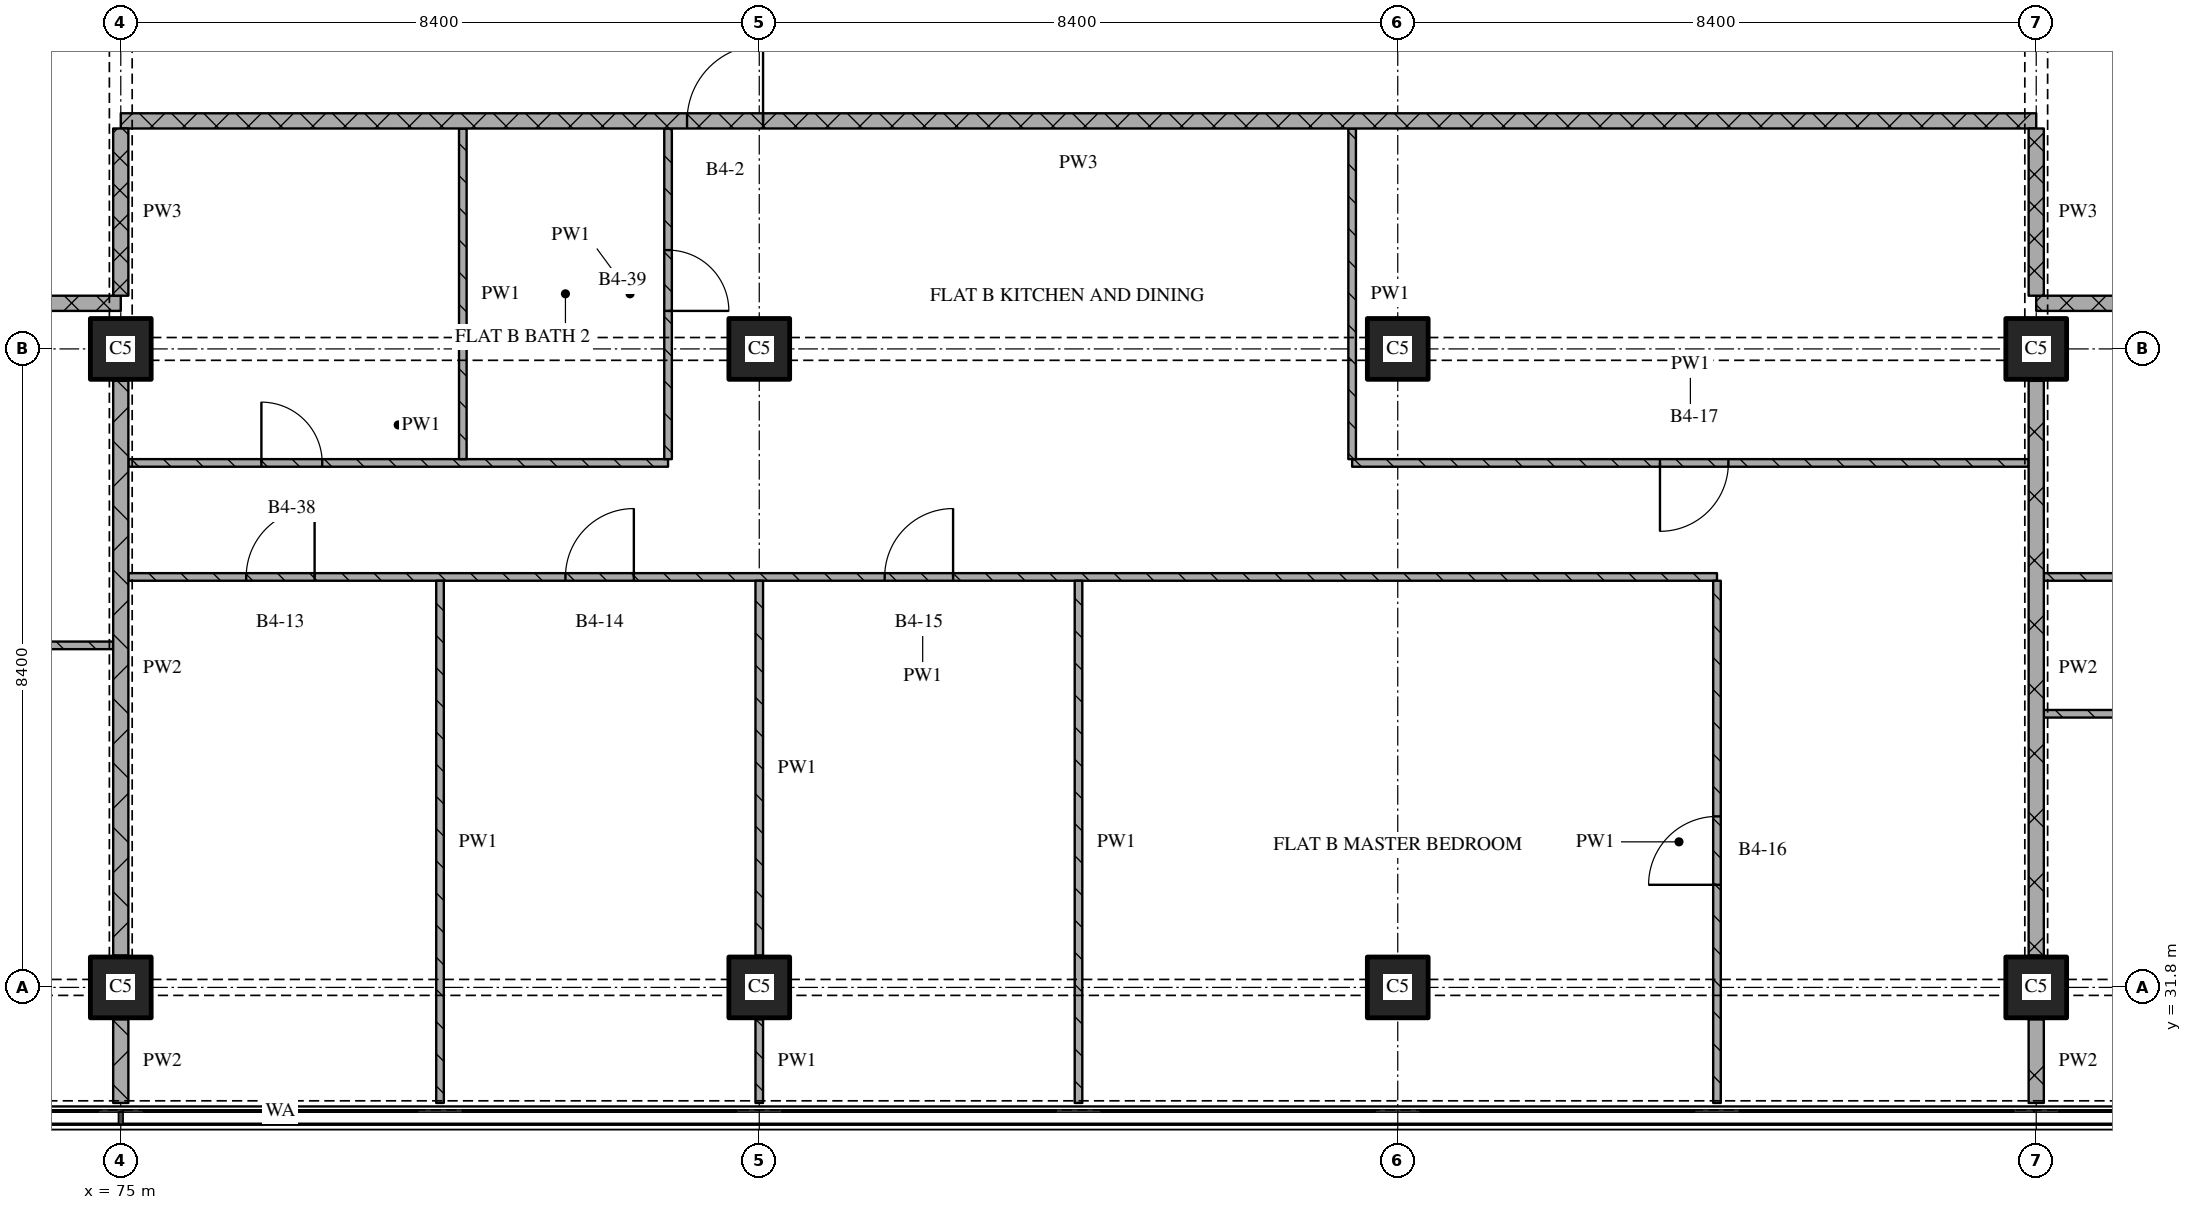
"""IFC4 building model, lengths in metres.
Left out: names, types, materials, properties, quantities, classifications, styles, units other than length and angle.
Written with IfcOpenShell. Run it as: python <this file> out.ifc"""

import sys

from ifc_helpers import new_model, si_unit, direction, frame, frame_2d, origin, origin_2d, place, context, subcontext, project, spatial, rectangle, extrude, element, fill, save


model = new_model("IFC4")
c1 = context("Model", 3, precision=1e-05, world=origin(), true_north=direction((0.0, 1.0)))
c2 = subcontext(c1, "Body", "Model", "MODEL_VIEW")
j1 = project(units=[si_unit("LENGTHUNIT", "METRE"), si_unit("PLANEANGLEUNIT", "RADIAN")], contexts=[c1])
p1 = place(None, origin())
s1 = spatial("IfcSite", under=j1, at=p1, CompositionType="ELEMENT")
p2 = place(p1, origin())
s2 = spatial("IfcBuilding", under=s1, at=p2, CompositionType="ELEMENT")
p3 = place(p2, frame((0.0, 0.0, 131.25)))
s3 = spatial("IfcBuildingStorey", under=s2, at=p3, CompositionType="ELEMENT", Elevation=131.25)
for number, where, z_axis, x_axis in (
    (1, (75.0, 31.8, 0.0), (0.0, 0.0, 1.0), (1.0, 0.0, 0.0)),
    (2, (75.0, 40.2, 0.0), (0.0, 0.0, 1.0), (1.0, 0.0, 0.0)),
    (3, (83.4, 31.8, 0.0), (0.0, 0.0, 1.0), (1.0, 0.0, 0.0)),
    (4, (83.4, 40.2, 0.0), (0.0, 0.0, 1.0), (1.0, 0.0, 0.0)),
    (5, (91.8, 31.8, 0.0), (0.0, 0.0, 1.0), (1.0, 0.0, 0.0)),
    (6, (91.8, 40.2, 0.0), (0.0, 0.0, 1.0), (1.0, 0.0, 0.0)),
    (7, (100.2, 31.8, 0.0), (0.0, 0.0, 1.0), (1.0, 0.0, 0.0)),
    (8, (100.2, 40.2, 0.0), (0.0, 0.0, 1.0), (1.0, 0.0, 0.0)),
):
    element("IfcColumn", number, at=place(p3, frame(where, z_axis=z_axis, x_axis=x_axis)), inside=s3, PredefinedType="COLUMN", context=c2, shape_type="SweptSolid", body=[
        extrude(rectangle(XDim=0.8, YDim=0.8, at=origin_2d()), origin(), (0.0, 0.0, 1.0), 3.6),
    ])
p4 = place(p3, frame((100.3, 35.4, 0.0), z_axis=(0.0, 0.0, 1.0), x_axis=(1.0, 0.0, 0.0)))
e9 = element("IfcWall", 9, at=p4, inside=s3, PredefinedType="PARTITIONING", context=c2, shape_type="SweptSolid", body=[
    extrude(rectangle(XDim=8.3, YDim=0.1, at=frame_2d((4.15, 0.0))), origin(), (0.0, 0.0, 1.0), 3.32),
])
p5 = place(p3, frame((65.7, 36.3, 0.0), z_axis=(0.0, 0.0, 1.0), x_axis=(1.0, 0.0, 0.0)))
e10 = element("IfcWall", 10, at=p5, inside=s3, PredefinedType="PARTITIONING", context=c2, shape_type="SweptSolid", body=[
    extrude(rectangle(XDim=9.2, YDim=0.1, at=frame_2d((4.6, 0.0))), origin(), (0.0, 0.0, 1.0), 3.32),
])
p6 = place(p5, frame((6.5, 0.0, 0.0)))
e11 = element("IfcOpeningElement", 11, at=p6, cuts=e10, PredefinedType="OPENING", context=c2, shape_type="SweptSolid", body=[
    extrude(rectangle(XDim=0.8, YDim=2.1, at=frame_2d((0.4, 1.05))), frame((0.0, 0.06, 0.0), z_axis=(0.0, -1.0, 0.0), x_axis=(1.0, 0.0, 0.0)), (0.0, 0.0, 1.0), 0.12),
])
p7 = place(p3, frame((96.0, 37.2, 0.0), z_axis=(0.0, 0.0, 1.0), x_axis=(-1.0, 0.0, 0.0)))
e12 = element("IfcWall", 12, at=p7, inside=s3, PredefinedType="PARTITIONING", context=c2, shape_type="SweptSolid", body=[
    extrude(rectangle(XDim=20.9, YDim=0.1, at=frame_2d((10.45, 0.0))), origin(), (0.0, 0.0, 1.0), 3.32),
])
p8 = place(p7, frame((10.05, 0.0, 0.0)))
e13 = element("IfcOpeningElement", 13, at=p8, cuts=e12, PredefinedType="OPENING", context=c2, shape_type="SweptSolid", body=[
    extrude(rectangle(XDim=0.9, YDim=2.1, at=frame_2d((0.45, 1.05))), frame((0.0, 0.06, 0.0), z_axis=(0.0, -1.0, 0.0), x_axis=(1.0, 0.0, 0.0)), (0.0, 0.0, 1.0), 0.12),
])
p9 = place(p7, frame((14.25, 0.0, 0.0)))
e14 = element("IfcOpeningElement", 14, at=p9, cuts=e12, PredefinedType="OPENING", context=c2, shape_type="SweptSolid", body=[
    extrude(rectangle(XDim=0.9, YDim=2.1, at=frame_2d((0.45, 1.05))), frame((0.0, 0.06, 0.0), z_axis=(0.0, -1.0, 0.0), x_axis=(1.0, 0.0, 0.0)), (0.0, 0.0, 1.0), 0.12),
])
p10 = place(p7, frame((18.45, 0.0, 0.0)))
e15 = element("IfcOpeningElement", 15, at=p10, cuts=e12, PredefinedType="OPENING", context=c2, shape_type="SweptSolid", body=[
    extrude(rectangle(XDim=0.9, YDim=2.1, at=frame_2d((0.45, 1.05))), frame((0.0, 0.06, 0.0), z_axis=(0.0, -1.0, 0.0), x_axis=(1.0, 0.0, 0.0)), (0.0, 0.0, 1.0), 0.12),
])
p11 = place(p3, frame((100.3, 37.2, 0.0), z_axis=(0.0, 0.0, 1.0), x_axis=(1.0, 0.0, 0.0)))
e16 = element("IfcWall", 16, at=p11, inside=s3, PredefinedType="PARTITIONING", context=c2, shape_type="SweptSolid", body=[
    extrude(rectangle(XDim=11.0, YDim=0.1, at=frame_2d((5.5, 0.0))), origin(), (0.0, 0.0, 1.0), 3.32),
])
p12 = place(p11, frame((1.75, 0.0, 0.0)))
e17 = element("IfcOpeningElement", 17, at=p12, cuts=e16, PredefinedType="OPENING", context=c2, shape_type="SweptSolid", body=[
    extrude(rectangle(XDim=0.8, YDim=2.1, at=frame_2d((0.4, 1.05))), frame((0.0, 0.06, 0.0), z_axis=(0.0, -1.0, 0.0), x_axis=(1.0, 0.0, 0.0)), (0.0, 0.0, 1.0), 0.12),
])
p13 = place(p11, frame((6.25, 0.0, 0.0)))
e18 = element("IfcOpeningElement", 18, at=p13, cuts=e16, PredefinedType="OPENING", context=c2, shape_type="SweptSolid", body=[
    extrude(rectangle(XDim=0.8, YDim=2.1, at=frame_2d((0.4, 1.05))), frame((0.0, 0.06, 0.0), z_axis=(0.0, -1.0, 0.0), x_axis=(1.0, 0.0, 0.0)), (0.0, 0.0, 1.0), 0.12),
])
p14 = place(p3, frame((75.1, 38.7, 0.0), z_axis=(0.0, 0.0, 1.0), x_axis=(1.0, 0.0, 0.0)))
e19 = element("IfcWall", 19, at=p14, inside=s3, PredefinedType="PARTITIONING", context=c2, shape_type="SweptSolid", body=[
    extrude(rectangle(XDim=7.1, YDim=0.1, at=frame_2d((3.55, 0.0))), origin(), (0.0, 0.0, 1.0), 3.32),
])
p15 = place(p14, frame((1.75, 0.0, 0.0)))
e20 = element("IfcOpeningElement", 20, at=p15, cuts=e19, PredefinedType="OPENING", context=c2, shape_type="SweptSolid", body=[
    extrude(rectangle(XDim=0.8, YDim=2.1, at=frame_2d((0.4, 1.05))), frame((0.0, 0.06, 0.0), z_axis=(0.0, -1.0, 0.0), x_axis=(1.0, 0.0, 0.0)), (0.0, 0.0, 1.0), 0.12),
])
p16 = place(p3, frame((91.2, 38.7, 0.0), z_axis=(0.0, 0.0, 1.0), x_axis=(1.0, 0.0, 0.0)))
e21 = element("IfcWall", 21, at=p16, inside=s3, PredefinedType="PARTITIONING", context=c2, shape_type="SweptSolid", body=[
    extrude(rectangle(XDim=8.9, YDim=0.1, at=frame_2d((4.45, 0.0))), origin(), (0.0, 0.0, 1.0), 3.32),
])
p17 = place(p16, frame((4.05, 0.0, 0.0)))
e22 = element("IfcOpeningElement", 22, at=p17, cuts=e21, PredefinedType="OPENING", context=c2, shape_type="SweptSolid", body=[
    extrude(rectangle(XDim=0.9, YDim=2.1, at=frame_2d((0.45, 1.05))), frame((0.0, 0.06, 0.0), z_axis=(0.0, -1.0, 0.0), x_axis=(1.0, 0.0, 0.0)), (0.0, 0.0, 1.0), 0.12),
])
p18 = place(p3, frame((75.0, 40.8, 0.0), z_axis=(0.0, 0.0, 1.0), x_axis=(-1.0, 0.0, 0.0)))
e23 = element("IfcWall", 23, at=p18, inside=s3, PredefinedType="PARTITIONING", context=c2, shape_type="SweptSolid", body=[
    extrude(rectangle(XDim=24.18, YDim=0.2, at=frame_2d((12.09, 0.0))), origin(), (0.0, 0.0, 1.0), 3.32),
])
p19 = place(p18, frame((9.55, 0.0, 0.0)))
e24 = element("IfcOpeningElement", 24, at=p19, cuts=e23, PredefinedType="OPENING", context=c2, shape_type="SweptSolid", body=[
    extrude(rectangle(XDim=1.0, YDim=2.1, at=frame_2d((0.5, 1.05))), frame((0.0, 0.11, 0.0), z_axis=(0.0, -1.0, 0.0), x_axis=(1.0, 0.0, 0.0)), (0.0, 0.0, 1.0), 0.22),
])
p20 = place(p3, frame((124.38, 40.8, 0.0), z_axis=(0.0, 0.0, 1.0), x_axis=(-1.0, 0.0, 0.0)))
e25 = element("IfcWall", 25, at=p20, inside=s3, PredefinedType="PARTITIONING", context=c2, shape_type="SweptSolid", body=[
    extrude(rectangle(XDim=24.18, YDim=0.2, at=frame_2d((12.09, 0.0))), origin(), (0.0, 0.0, 1.0), 3.32),
])
p21 = place(p20, frame((11.83, 0.0, 0.0)))
e26 = element("IfcOpeningElement", 26, at=p21, cuts=e25, PredefinedType="OPENING", context=c2, shape_type="SweptSolid", body=[
    extrude(rectangle(XDim=1.0, YDim=2.1, at=frame_2d((0.5, 1.05))), frame((0.0, 0.11, 0.0), z_axis=(0.0, -1.0, 0.0), x_axis=(1.0, 0.0, 0.0)), (0.0, 0.0, 1.0), 0.22),
])
p22 = place(p3, frame((100.2, 43.2, 0.0), z_axis=(0.0, 0.0, 1.0), x_axis=(-1.0, 0.0, 0.0)))
e27 = element("IfcWall", 27, at=p22, inside=s3, PredefinedType="PARTITIONING", context=c2, shape_type="SweptSolid", body=[
    extrude(rectangle(XDim=25.2, YDim=0.2, at=frame_2d((12.6, 0.0))), origin(), (0.0, 0.0, 1.0), 3.32),
])
p23 = place(p22, frame((16.75, 0.0, 0.0)))
e28 = element("IfcOpeningElement", 28, at=p23, cuts=e27, PredefinedType="OPENING", context=c2, shape_type="SweptSolid", body=[
    extrude(rectangle(XDim=1.0, YDim=2.1, at=frame_2d((0.5, 1.05))), frame((0.0, 0.11, 0.0), z_axis=(0.0, -1.0, 0.0), x_axis=(1.0, 0.0, 0.0)), (0.0, 0.0, 1.0), 0.22),
])
p24 = place(p3, frame((75.0, 43.1, 0.0), z_axis=(0.0, 0.0, 1.0), x_axis=(0.0, -1.0, 0.0)))
e29 = element("IfcWall", 29, at=p24, inside=s3, PredefinedType="PARTITIONING", context=c2, shape_type="SweptSolid", body=[
    extrude(rectangle(XDim=2.2, YDim=0.2, at=frame_2d((1.1, 0.0))), origin(), (0.0, 0.0, 1.0), 2.43),
])
p25 = place(p3, frame((75.0, 31.38, 0.0), z_axis=(0.0, 0.0, 1.0), x_axis=(0.0, -1.0, 0.0)))
e30 = element("IfcWall", 30, at=p25, inside=s3, PredefinedType="PARTITIONING", context=c2, shape_type="SweptSolid", body=[
    extrude(rectangle(XDim=1.1, YDim=0.2, at=frame_2d((0.55, 0.0))), origin(), (0.0, 0.0, 1.0), 3.32),
])
p26 = place(p3, frame((75.0, 39.78, 0.0), z_axis=(0.0, 0.0, 1.0), x_axis=(0.0, -1.0, 0.0)))
e31 = element("IfcWall", 31, at=p26, inside=s3, PredefinedType="PARTITIONING", context=c2, shape_type="SweptSolid", body=[
    extrude(rectangle(XDim=7.56, YDim=0.2, at=frame_2d((3.78, 0.0))), origin(), (0.0, 0.0, 1.0), 2.83),
])
p27 = place(p3, frame((79.2, 37.15, 0.0), z_axis=(0.0, 0.0, 1.0), x_axis=(0.0, -1.0, 0.0)))
e32 = element("IfcWall", 32, at=p27, inside=s3, PredefinedType="PARTITIONING", context=c2, shape_type="SweptSolid", body=[
    extrude(rectangle(XDim=6.87, YDim=0.1, at=frame_2d((3.435, 0.0))), origin(), (0.0, 0.0, 1.0), 3.32),
])
p28 = place(p3, frame((79.5, 43.1, 0.0), z_axis=(0.0, 0.0, 1.0), x_axis=(0.0, -1.0, 0.0)))
e33 = element("IfcWall", 33, at=p28, inside=s3, PredefinedType="PARTITIONING", context=c2, shape_type="SweptSolid", body=[
    extrude(rectangle(XDim=4.35, YDim=0.1, at=frame_2d((2.175, 0.0))), origin(), (0.0, 0.0, 1.0), 3.32),
])
p29 = place(p3, frame((82.2, 38.75, 0.0), z_axis=(0.0, 0.0, 1.0), x_axis=(0.0, 1.0, 0.0)))
e34 = element("IfcWall", 34, at=p29, inside=s3, PredefinedType="PARTITIONING", context=c2, shape_type="SweptSolid", body=[
    extrude(rectangle(XDim=4.35, YDim=0.1, at=frame_2d((2.175, 0.0))), origin(), (0.0, 0.0, 1.0), 3.32),
])
p30 = place(p29, frame((1.95, 0.0, 0.0)))
e35 = element("IfcOpeningElement", 35, at=p30, cuts=e34, PredefinedType="OPENING", context=c2, shape_type="SweptSolid", body=[
    extrude(rectangle(XDim=0.8, YDim=2.1, at=frame_2d((0.4, 1.05))), frame((0.0, 0.06, 0.0), z_axis=(0.0, -1.0, 0.0), x_axis=(1.0, 0.0, 0.0)), (0.0, 0.0, 1.0), 0.12),
])
p31 = place(p3, frame((83.4, 31.38, 0.0), z_axis=(0.0, 0.0, 1.0), x_axis=(0.0, -1.0, 0.0)))
e36 = element("IfcWall", 36, at=p31, inside=s3, PredefinedType="PARTITIONING", context=c2, shape_type="SweptSolid", body=[
    extrude(rectangle(XDim=1.1, YDim=0.1, at=frame_2d((0.55, 0.0))), origin(), (0.0, 0.0, 1.0), 3.32),
])
p32 = place(p3, frame((83.4, 37.15, 0.0), z_axis=(0.0, 0.0, 1.0), x_axis=(0.0, -1.0, 0.0)))
e37 = element("IfcWall", 37, at=p32, inside=s3, PredefinedType="PARTITIONING", context=c2, shape_type="SweptSolid", body=[
    extrude(rectangle(XDim=4.93, YDim=0.1, at=frame_2d((2.465, 0.0))), origin(), (0.0, 0.0, 1.0), 3.32),
])
p33 = place(p3, frame((87.6, 37.15, 0.0), z_axis=(0.0, 0.0, 1.0), x_axis=(0.0, -1.0, 0.0)))
e38 = element("IfcWall", 38, at=p33, inside=s3, PredefinedType="PARTITIONING", context=c2, shape_type="SweptSolid", body=[
    extrude(rectangle(XDim=6.87, YDim=0.1, at=frame_2d((3.435, 0.0))), origin(), (0.0, 0.0, 1.0), 3.32),
])
p34 = place(p3, frame((91.2, 43.1, 0.0), z_axis=(0.0, 0.0, 1.0), x_axis=(0.0, -1.0, 0.0)))
e39 = element("IfcWall", 39, at=p34, inside=s3, PredefinedType="PARTITIONING", context=c2, shape_type="SweptSolid", body=[
    extrude(rectangle(XDim=4.35, YDim=0.1, at=frame_2d((2.175, 0.0))), origin(), (0.0, 0.0, 1.0), 3.32),
])
p35 = place(p3, frame((96.0, 30.28, 0.0), z_axis=(0.0, 0.0, 1.0), x_axis=(0.0, 1.0, 0.0)))
e40 = element("IfcWall", 40, at=p35, inside=s3, PredefinedType="PARTITIONING", context=c2, shape_type="SweptSolid", body=[
    extrude(rectangle(XDim=6.87, YDim=0.1, at=frame_2d((3.435, 0.0))), origin(), (0.0, 0.0, 1.0), 3.32),
])
p36 = place(p35, frame((2.87, 0.0, 0.0)))
e41 = element("IfcOpeningElement", 41, at=p36, cuts=e40, PredefinedType="OPENING", context=c2, shape_type="SweptSolid", body=[
    extrude(rectangle(XDim=0.9, YDim=2.1, at=frame_2d((0.45, 1.05))), frame((0.0, 0.06, 0.0), z_axis=(0.0, -1.0, 0.0), x_axis=(1.0, 0.0, 0.0)), (0.0, 0.0, 1.0), 0.12),
])
p37 = place(p3, frame((100.2, 43.1, 0.0), z_axis=(0.0, 0.0, 1.0), x_axis=(0.0, -1.0, 0.0)))
e42 = element("IfcWall", 42, at=p37, inside=s3, PredefinedType="PARTITIONING", context=c2, shape_type="SweptSolid", body=[
    extrude(rectangle(XDim=2.2, YDim=0.2, at=frame_2d((1.1, 0.0))), origin(), (0.0, 0.0, 1.0), 2.43),
])
p38 = place(p3, frame((100.2, 31.38, 0.0), z_axis=(0.0, 0.0, 1.0), x_axis=(0.0, -1.0, 0.0)))
e43 = element("IfcWall", 43, at=p38, inside=s3, PredefinedType="PARTITIONING", context=c2, shape_type="SweptSolid", body=[
    extrude(rectangle(XDim=1.1, YDim=0.2, at=frame_2d((0.55, 0.0))), origin(), (0.0, 0.0, 1.0), 3.32),
])
p39 = place(p3, frame((100.2, 39.78, 0.0), z_axis=(0.0, 0.0, 1.0), x_axis=(0.0, -1.0, 0.0)))
e44 = element("IfcWall", 44, at=p39, inside=s3, PredefinedType="PARTITIONING", context=c2, shape_type="SweptSolid", body=[
    extrude(rectangle(XDim=7.56, YDim=0.2, at=frame_2d((3.78, 0.0))), origin(), (0.0, 0.0, 1.0), 2.83),
])
p40 = place(p8, origin())
e45 = element("IfcDoor", 45, at=p40, inside=s3, OperationType="SINGLE_SWING_RIGHT", PredefinedType="DOOR", context=c2, shape_type="SweptSolid", body=[
    extrude(rectangle(XDim=0.9, YDim=2.1, at=frame_2d((0.45, 1.05))), frame((0.0, 0.025, 0.0), z_axis=(0.0, -1.0, 0.0), x_axis=(1.0, 0.0, 0.0)), (0.0, 0.0, 1.0), 0.05),
])
fill(e13, e45)
p41 = place(p9, origin())
e46 = element("IfcDoor", 46, at=p41, inside=s3, OperationType="SINGLE_SWING_RIGHT", PredefinedType="DOOR", context=c2, shape_type="SweptSolid", body=[
    extrude(rectangle(XDim=0.9, YDim=2.1, at=frame_2d((0.45, 1.05))), frame((0.0, 0.025, 0.0), z_axis=(0.0, -1.0, 0.0), x_axis=(1.0, 0.0, 0.0)), (0.0, 0.0, 1.0), 0.05),
])
fill(e14, e46)
p42 = place(p10, origin())
e47 = element("IfcDoor", 47, at=p42, inside=s3, OperationType="SINGLE_SWING_RIGHT", PredefinedType="DOOR", context=c2, shape_type="SweptSolid", body=[
    extrude(rectangle(XDim=0.9, YDim=2.1, at=frame_2d((0.45, 1.05))), frame((0.0, 0.025, 0.0), z_axis=(0.0, -1.0, 0.0), x_axis=(1.0, 0.0, 0.0)), (0.0, 0.0, 1.0), 0.05),
])
fill(e15, e47)
p43 = place(p15, origin())
e48 = element("IfcDoor", 48, at=p43, inside=s3, OperationType="SINGLE_SWING_LEFT", PredefinedType="DOOR", context=c2, shape_type="SweptSolid", body=[
    extrude(rectangle(XDim=0.8, YDim=2.1, at=frame_2d((0.4, 1.05))), frame((0.0, 0.025, 0.0), z_axis=(0.0, -1.0, 0.0), x_axis=(1.0, 0.0, 0.0)), (0.0, 0.0, 1.0), 0.05),
])
fill(e20, e48)
p44 = place(p17, origin())
e49 = element("IfcDoor", 49, at=p44, inside=s3, OperationType="SINGLE_SWING_RIGHT", PredefinedType="DOOR", context=c2, shape_type="SweptSolid", body=[
    extrude(rectangle(XDim=0.9, YDim=2.1, at=frame_2d((0.45, 1.05))), frame((0.0, 0.025, 0.0), z_axis=(0.0, -1.0, 0.0), x_axis=(1.0, 0.0, 0.0)), (0.0, 0.0, 1.0), 0.05),
])
fill(e22, e49)
p45 = place(p23, origin())
e50 = element("IfcDoor", 50, at=p45, inside=s3, OperationType="SINGLE_SWING_RIGHT", PredefinedType="DOOR", context=c2, shape_type="SweptSolid", body=[
    extrude(rectangle(XDim=1.0, YDim=2.1, at=frame_2d((0.5, 1.05))), frame((0.0, 0.025, 0.0), z_axis=(0.0, -1.0, 0.0), x_axis=(1.0, 0.0, 0.0)), (0.0, 0.0, 1.0), 0.05),
])
fill(e28, e50)
p46 = place(p30, origin())
e51 = element("IfcDoor", 51, at=p46, inside=s3, OperationType="SINGLE_SWING_RIGHT", PredefinedType="DOOR", context=c2, shape_type="SweptSolid", body=[
    extrude(rectangle(XDim=0.8, YDim=2.1, at=frame_2d((0.4, 1.05))), frame((0.0, 0.025, 0.0), z_axis=(0.0, -1.0, 0.0), x_axis=(1.0, 0.0, 0.0)), (0.0, 0.0, 1.0), 0.05),
])
fill(e35, e51)
p47 = place(p36, origin())
e52 = element("IfcDoor", 52, at=p47, inside=s3, OperationType="SINGLE_SWING_LEFT", PredefinedType="DOOR", context=c2, shape_type="SweptSolid", body=[
    extrude(rectangle(XDim=0.9, YDim=2.1, at=frame_2d((0.45, 1.05))), frame((0.0, 0.025, 0.0), z_axis=(0.0, -1.0, 0.0), x_axis=(1.0, 0.0, 0.0)), (0.0, 0.0, 1.0), 0.05),
])
fill(e41, e52)
save(model, sys.argv[1])
